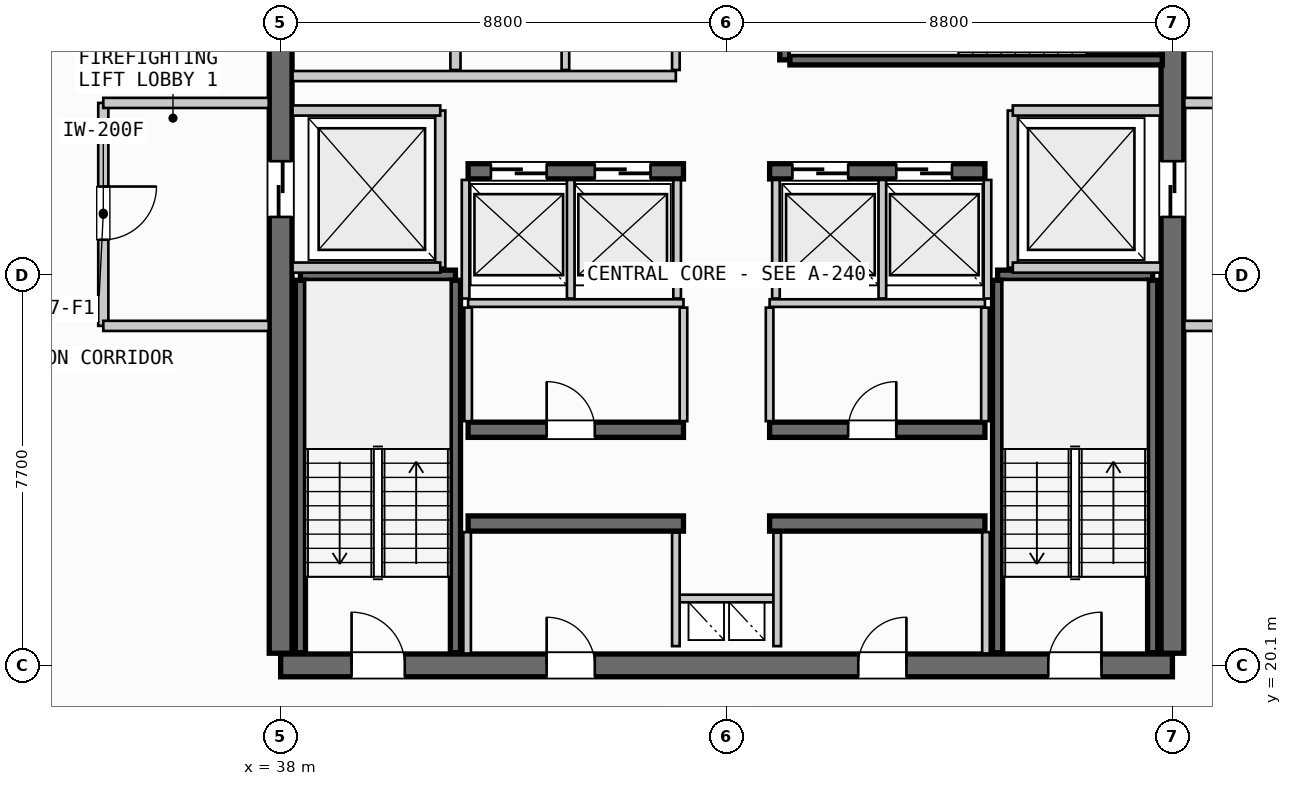
"""IFC4 building model, lengths in metres.
Left out: names, types, materials, properties, quantities, classifications, styles, units other than length and angle.
Written with IfcOpenShell. Run it as: python <this file> out.ifc"""

import sys

from ifc_helpers import new_model, si_unit, direction, frame, frame_2d, origin, place, context, subcontext, project, spatial, rectangle, extrude, source, transform, mapped, element, fill, save


model = new_model("IFC4")
c1 = context("Model", 3, precision=1e-05, world=origin(), true_north=direction((0.0, 1.0)))
c2 = subcontext(c1, "Body", "Model", "MODEL_VIEW")
j1 = project(units=[si_unit("LENGTHUNIT", "METRE"), si_unit("PLANEANGLEUNIT", "RADIAN")], contexts=[c1])
p1 = place(None, origin())
s1 = spatial("IfcSite", under=j1, at=p1, CompositionType="ELEMENT")
p2 = place(p1, origin())
s2 = spatial("IfcBuilding", under=s1, at=p2, CompositionType="ELEMENT")
p3 = place(p2, frame((0.0, 0.0, 290.5)))
s3 = spatial("IfcBuildingStorey", under=s2, at=p3, CompositionType="ELEMENT", Elevation=290.5)
p4 = place(p3, frame((38.0, 20.1, 0.0), z_axis=(0.0, 0.0, 1.0), x_axis=(1.0, 0.0, 0.0)))
e1 = element("IfcWall", 1, at=p4, inside=s3, PredefinedType="SHEAR", context=c2, shape_type="SweptSolid", body=[
    extrude(rectangle(XDim=17.6, YDim=0.45, at=frame_2d((8.8, 0.0))), origin(), (0.0, 0.0, 1.0), 3.21),
])
p5 = place(p4, frame((1.4, 0.0, 0.0)))
e2 = element("IfcOpeningElement", 2, at=p5, cuts=e1, PredefinedType="OPENING", context=c2, shape_type="SweptSolid", body=[
    extrude(rectangle(XDim=1.05, YDim=2.15, at=frame_2d((0.525, 1.075))), frame((0.0, 0.235, 0.0), z_axis=(0.0, -1.0, 0.0), x_axis=(1.0, 0.0, 0.0)), (0.0, 0.0, 1.0), 0.47),
])
p6 = place(p4, frame((15.15, 0.0, 0.0)))
e3 = element("IfcOpeningElement", 3, at=p6, cuts=e1, PredefinedType="OPENING", context=c2, shape_type="SweptSolid", body=[
    extrude(rectangle(XDim=1.05, YDim=2.15, at=frame_2d((0.525, 1.075))), frame((0.0, 0.235, 0.0), z_axis=(0.0, -1.0, 0.0), x_axis=(1.0, 0.0, 0.0)), (0.0, 0.0, 1.0), 0.47),
])
p7 = place(p4, frame((5.25, 0.0, 0.0)))
e4 = element("IfcOpeningElement", 4, at=p7, cuts=e1, PredefinedType="OPENING", context=c2, shape_type="SweptSolid", body=[
    extrude(rectangle(XDim=0.95, YDim=2.15, at=frame_2d((0.475, 1.075))), frame((0.0, 0.235, 0.0), z_axis=(0.0, -1.0, 0.0), x_axis=(1.0, 0.0, 0.0)), (0.0, 0.0, 1.0), 0.47),
])
p8 = place(p4, frame((11.4, 0.0, 0.0)))
e5 = element("IfcOpeningElement", 5, at=p8, cuts=e1, PredefinedType="OPENING", context=c2, shape_type="SweptSolid", body=[
    extrude(rectangle(XDim=0.95, YDim=2.15, at=frame_2d((0.475, 1.075))), frame((0.0, 0.235, 0.0), z_axis=(0.0, -1.0, 0.0), x_axis=(1.0, 0.0, 0.0)), (0.0, 0.0, 1.0), 0.47),
])
p9 = place(p3, frame((38.0, 35.26, 0.0), z_axis=(0.0, 0.0, 1.0), x_axis=(0.0, -1.0, 0.0)))
e6 = element("IfcWall", 6, at=p9, inside=s3, PredefinedType="SHEAR", context=c2, shape_type="SweptSolid", body=[
    extrude(rectangle(XDim=14.92, YDim=0.45, at=frame_2d((7.46, 0.0))), origin(), (0.0, 0.0, 1.0), 3.21),
])
p10 = place(p9, frame((5.21, 0.0, 0.0)))
e7 = element("IfcOpeningElement", 7, at=p10, cuts=e6, PredefinedType="OPENING", context=c2, shape_type="SweptSolid", body=[
    extrude(rectangle(XDim=1.1, YDim=2.2, at=frame_2d((0.55, 1.1))), frame((0.0, 0.235, 0.0), z_axis=(0.0, -1.0, 0.0), x_axis=(1.0, 0.0, 0.0)), (0.0, 0.0, 1.0), 0.47),
])
p11 = place(p3, frame((55.6, 20.34, 0.0), z_axis=(0.0, 0.0, 1.0), x_axis=(0.0, 1.0, 0.0)))
e8 = element("IfcWall", 8, at=p11, inside=s3, PredefinedType="SHEAR", context=c2, shape_type="SweptSolid", body=[
    extrude(rectangle(XDim=14.92, YDim=0.45, at=frame_2d((7.46, 0.0))), origin(), (0.0, 0.0, 1.0), 3.21),
])
p12 = place(p11, frame((12.71, 0.0, 0.0)))
e9 = element("IfcOpeningElement", 9, at=p12, cuts=e8, PredefinedType="OPENING", context=c2, shape_type="SweptSolid", body=[
    extrude(rectangle(XDim=1.05, YDim=2.15, at=frame_2d((0.525, 1.075))), frame((0.0, 0.235, 0.0), z_axis=(0.0, -1.0, 0.0), x_axis=(1.0, 0.0, 0.0)), (0.0, 0.0, 1.0), 0.47),
])
p13 = place(p11, frame((8.61, 0.0, 0.0)))
e10 = element("IfcOpeningElement", 10, at=p13, cuts=e8, PredefinedType="OPENING", context=c2, shape_type="SweptSolid", body=[
    extrude(rectangle(XDim=1.1, YDim=2.2, at=frame_2d((0.55, 1.1))), frame((0.0, 0.235, 0.0), z_axis=(0.0, -1.0, 0.0), x_axis=(1.0, 0.0, 0.0)), (0.0, 0.0, 1.0), 0.47),
])
for number, where, z_axis, x_axis in (
    (11, (41.7, 22.9, 0.0), (0.0, 0.0, 1.0), (1.0, 0.0, 0.0)),
    (12, (47.65, 22.9, 0.0), (0.0, 0.0, 1.0), (1.0, 0.0, 0.0)),
):
    element("IfcWall", number, at=place(p3, frame(where, z_axis=z_axis, x_axis=x_axis)), inside=s3, PredefinedType="SHEAR", context=c2, shape_type="SweptSolid", body=[
        extrude(rectangle(XDim=4.25, YDim=0.3, at=frame_2d((2.125, 0.0))), origin(), (0.0, 0.0, 1.0), 3.21),
    ])
p14 = place(p3, frame((41.7, 24.75, 0.0), z_axis=(0.0, 0.0, 1.0), x_axis=(1.0, 0.0, 0.0)))
e13 = element("IfcWall", 13, at=p14, inside=s3, PredefinedType="SHEAR", context=c2, shape_type="SweptSolid", body=[
    extrude(rectangle(XDim=4.25, YDim=0.3, at=frame_2d((2.125, 0.0))), origin(), (0.0, 0.0, 1.0), 3.21),
])
p15 = place(p14, frame((1.55, 0.0, 0.0)))
e14 = element("IfcOpeningElement", 14, at=p15, cuts=e13, PredefinedType="OPENING", context=c2, shape_type="SweptSolid", body=[
    extrude(rectangle(XDim=0.95, YDim=2.15, at=frame_2d((0.475, 1.075))), frame((0.0, 0.16, 0.0), z_axis=(0.0, -1.0, 0.0), x_axis=(1.0, 0.0, 0.0)), (0.0, 0.0, 1.0), 0.32),
])
p16 = place(p3, frame((47.65, 24.75, 0.0), z_axis=(0.0, 0.0, 1.0), x_axis=(1.0, 0.0, 0.0)))
e15 = element("IfcWall", 15, at=p16, inside=s3, PredefinedType="SHEAR", context=c2, shape_type="SweptSolid", body=[
    extrude(rectangle(XDim=4.25, YDim=0.3, at=frame_2d((2.125, 0.0))), origin(), (0.0, 0.0, 1.0), 3.21),
])
p17 = place(p16, frame((1.55, 0.0, 0.0)))
e16 = element("IfcOpeningElement", 16, at=p17, cuts=e15, PredefinedType="OPENING", context=c2, shape_type="SweptSolid", body=[
    extrude(rectangle(XDim=0.95, YDim=2.15, at=frame_2d((0.475, 1.075))), frame((0.0, 0.16, 0.0), z_axis=(0.0, -1.0, 0.0), x_axis=(1.0, 0.0, 0.0)), (0.0, 0.0, 1.0), 0.32),
])
p18 = place(p3, frame((41.7, 29.85, 0.0), z_axis=(0.0, 0.0, 1.0), x_axis=(1.0, 0.0, 0.0)))
e17 = element("IfcWall", 17, at=p18, inside=s3, PredefinedType="SHEAR", context=c2, shape_type="SweptSolid", body=[
    extrude(rectangle(XDim=4.25, YDim=0.3, at=frame_2d((2.125, 0.0))), origin(), (0.0, 0.0, 1.0), 3.21),
])
p19 = place(p18, frame((0.45, 0.0, 0.0)))
e18 = element("IfcOpeningElement", 18, at=p19, cuts=e17, PredefinedType="OPENING", context=c2, shape_type="SweptSolid", body=[
    extrude(rectangle(XDim=1.1, YDim=2.2, at=frame_2d((0.55, 1.1))), frame((0.0, 0.16, 0.0), z_axis=(0.0, -1.0, 0.0), x_axis=(1.0, 0.0, 0.0)), (0.0, 0.0, 1.0), 0.32),
])
p20 = place(p18, frame((2.5, 0.0, 0.0)))
e19 = element("IfcOpeningElement", 19, at=p20, cuts=e17, PredefinedType="OPENING", context=c2, shape_type="SweptSolid", body=[
    extrude(rectangle(XDim=1.1, YDim=2.2, at=frame_2d((0.55, 1.1))), frame((0.0, 0.16, 0.0), z_axis=(0.0, -1.0, 0.0), x_axis=(1.0, 0.0, 0.0)), (0.0, 0.0, 1.0), 0.32),
])
p21 = place(p3, frame((47.65, 29.85, 0.0), z_axis=(0.0, 0.0, 1.0), x_axis=(1.0, 0.0, 0.0)))
e20 = element("IfcWall", 20, at=p21, inside=s3, PredefinedType="SHEAR", context=c2, shape_type="SweptSolid", body=[
    extrude(rectangle(XDim=4.25, YDim=0.3, at=frame_2d((2.125, 0.0))), origin(), (0.0, 0.0, 1.0), 3.21),
])
p22 = place(p21, frame((0.45, 0.0, 0.0)))
e21 = element("IfcOpeningElement", 21, at=p22, cuts=e20, PredefinedType="OPENING", context=c2, shape_type="SweptSolid", body=[
    extrude(rectangle(XDim=1.1, YDim=2.2, at=frame_2d((0.55, 1.1))), frame((0.0, 0.16, 0.0), z_axis=(0.0, -1.0, 0.0), x_axis=(1.0, 0.0, 0.0)), (0.0, 0.0, 1.0), 0.32),
])
p23 = place(p21, frame((2.5, 0.0, 0.0)))
e22 = element("IfcOpeningElement", 22, at=p23, cuts=e20, PredefinedType="OPENING", context=c2, shape_type="SweptSolid", body=[
    extrude(rectangle(XDim=1.1, YDim=2.2, at=frame_2d((0.55, 1.1))), frame((0.0, 0.16, 0.0), z_axis=(0.0, -1.0, 0.0), x_axis=(1.0, 0.0, 0.0)), (0.0, 0.0, 1.0), 0.32),
])
p24 = place(p3, frame((38.39, 27.8, 0.0), z_axis=(0.0, 0.0, 1.0), x_axis=(1.0, 0.0, 0.0)))
e23 = element("IfcWall", 23, at=p24, inside=s3, PredefinedType="SHEAR", context=c2, shape_type="SweptSolid", body=[
    extrude(rectangle(XDim=3.06, YDim=0.2, at=frame_2d((1.53, 0.0))), origin(), (0.0, 0.0, 1.0), 3.21),
])
for number, where, z_axis, x_axis in (
    (24, (41.45, 27.7, 0.0), (0.0, 0.0, 1.0), (0.0, -1.0, 0.0)),
    (25, (38.39, 20.35, 0.0), (0.0, 0.0, 1.0), (0.0, 1.0, 0.0)),
):
    element("IfcWall", number, at=place(p3, frame(where, z_axis=z_axis, x_axis=x_axis)), inside=s3, PredefinedType="SHEAR", context=c2, shape_type="SweptSolid", body=[
        extrude(rectangle(XDim=7.35, YDim=0.2, at=frame_2d((3.675, 0.0))), origin(), (0.0, 0.0, 1.0), 3.21),
    ])
p25 = place(p3, frame((52.15, 27.8, 0.0), z_axis=(0.0, 0.0, 1.0), x_axis=(1.0, 0.0, 0.0)))
e26 = element("IfcWall", 26, at=p25, inside=s3, PredefinedType="SHEAR", context=c2, shape_type="SweptSolid", body=[
    extrude(rectangle(XDim=3.06, YDim=0.2, at=frame_2d((1.53, 0.0))), origin(), (0.0, 0.0, 1.0), 3.21),
])
for number, where, z_axis, x_axis in (
    (27, (55.21, 27.7, 0.0), (0.0, 0.0, 1.0), (0.0, -1.0, 0.0)),
    (28, (52.15, 20.35, 0.0), (0.0, 0.0, 1.0), (0.0, 1.0, 0.0)),
):
    element("IfcWall", number, at=place(p3, frame(where, z_axis=z_axis, x_axis=x_axis)), inside=s3, PredefinedType="SHEAR", context=c2, shape_type="SweptSolid", body=[
        extrude(rectangle(XDim=7.35, YDim=0.2, at=frame_2d((3.675, 0.0))), origin(), (0.0, 0.0, 1.0), 3.21),
    ])
p26 = place(p3, frame((47.95, 32.05, 0.0), z_axis=(0.0, 0.0, 1.0), x_axis=(0.0, 1.0, 0.0)))
e29 = element("IfcWall", 29, at=p26, inside=s3, PredefinedType="SHEAR", context=c2, shape_type="SweptSolid", body=[
    extrude(rectangle(XDim=3.06, YDim=0.2, at=frame_2d((1.53, 0.0))), origin(), (0.0, 0.0, 1.0), 3.21),
])
p27 = place(p3, frame((55.4, 32.05, 0.0), z_axis=(0.0, 0.0, 1.0), x_axis=(-1.0, 0.0, 0.0)))
e30 = element("IfcWall", 30, at=p27, inside=s3, PredefinedType="SHEAR", context=c2, shape_type="SweptSolid", body=[
    extrude(rectangle(XDim=7.35, YDim=0.2, at=frame_2d((3.675, 0.0))), origin(), (0.0, 0.0, 1.0), 3.21),
])
p28 = place(p3, frame((45.8, 21.42, 0.0), z_axis=(0.0, 0.0, 1.0), x_axis=(1.0, 0.0, 0.0)))
e31 = element("IfcWall", 31, at=p28, inside=s3, PredefinedType="PARTITIONING", context=c2, shape_type="SweptSolid", body=[
    extrude(rectangle(XDim=2.0, YDim=0.15, at=frame_2d((1.0, 0.0))), origin(), (0.0, 0.0, 1.0), 2.315),
])
for number, where, z_axis, x_axis in (
    (32, (45.8, 20.48, 0.0), (0.0, 0.0, 1.0), (0.0, 1.0, 0.0)),
    (33, (47.8, 20.48, 0.0), (0.0, 0.0, 1.0), (0.0, 1.0, 0.0)),
):
    element("IfcWall", number, at=place(p3, frame(where, z_axis=z_axis, x_axis=x_axis)), inside=s3, PredefinedType="PARTITIONING", context=c2, shape_type="SweptSolid", body=[
        extrude(rectangle(XDim=2.24, YDim=0.15, at=frame_2d((1.12, 0.0))), origin(), (0.0, 0.0, 1.0), 2.315),
    ])
p29 = place(p3, frame((41.15, 27.95, 0.0), z_axis=(0.0, 0.0, 1.0), x_axis=(0.0, 1.0, 0.0)))
e34 = element("IfcWall", 34, at=p29, inside=s3, PredefinedType="PARTITIONING", context=c2, shape_type="SweptSolid", body=[
    extrude(rectangle(XDim=3.1, YDim=0.2, at=frame_2d((1.55, 0.0))), origin(), (0.0, 0.0, 1.0), 2.315),
])
for number, where, z_axis, x_axis in (
    (35, (38.235, 27.95, 0.0), (0.0, 0.0, 1.0), (1.0, 0.0, 0.0)),
    (36, (38.235, 31.05, 0.0), (0.0, 0.0, 1.0), (1.0, 0.0, 0.0)),
):
    element("IfcWall", number, at=place(p3, frame(where, z_axis=z_axis, x_axis=x_axis)), inside=s3, PredefinedType="PARTITIONING", context=c2, shape_type="SweptSolid", body=[
        extrude(rectangle(XDim=2.915, YDim=0.2, at=frame_2d((1.458, 0.0))), origin(), (0.0, 0.0, 1.0), 2.315),
    ])
p30 = place(p3, frame((34.5, 31.2, 0.0), z_axis=(0.0, 0.0, 1.0), x_axis=(0.0, -1.0, 0.0)))
e37 = element("IfcWall", 37, at=p30, inside=s3, PredefinedType="PARTITIONING", context=c2, shape_type="SweptSolid", body=[
    extrude(rectangle(XDim=4.4, YDim=0.2, at=frame_2d((2.2, 0.0))), origin(), (0.0, 0.0, 1.0), 2.315),
])
p31 = place(p30, frame((1.65, 0.0, 0.0)))
e38 = element("IfcOpeningElement", 38, at=p31, cuts=e37, PredefinedType="OPENING", context=c2, shape_type="SweptSolid", body=[
    extrude(rectangle(XDim=1.05, YDim=2.15, at=frame_2d((0.525, 1.075))), frame((0.0, 0.11, 0.0), z_axis=(0.0, -1.0, 0.0), x_axis=(1.0, 0.0, 0.0)), (0.0, 0.0, 1.0), 0.22),
])
for number, where, z_axis, x_axis in (
    (39, (34.5, 26.8, 0.0), (0.0, 0.0, 1.0), (1.0, 0.0, 0.0)),
    (40, (34.5, 31.2, 0.0), (0.0, 0.0, 1.0), (1.0, 0.0, 0.0)),
):
    element("IfcWall", number, at=place(p3, frame(where, z_axis=z_axis, x_axis=x_axis)), inside=s3, PredefinedType="PARTITIONING", context=c2, shape_type="SweptSolid", body=[
        extrude(rectangle(XDim=3.265, YDim=0.2, at=frame_2d((1.632, 0.0))), origin(), (0.0, 0.0, 1.0), 2.315),
    ])
p32 = place(p3, frame((52.45, 27.95, 0.0), z_axis=(0.0, 0.0, 1.0), x_axis=(0.0, 1.0, 0.0)))
e41 = element("IfcWall", 41, at=p32, inside=s3, PredefinedType="PARTITIONING", context=c2, shape_type="SweptSolid", body=[
    extrude(rectangle(XDim=3.1, YDim=0.2, at=frame_2d((1.55, 0.0))), origin(), (0.0, 0.0, 1.0), 2.315),
])
for number, where, z_axis, x_axis in (
    (42, (52.45, 27.95, 0.0), (0.0, 0.0, 1.0), (1.0, 0.0, 0.0)),
    (43, (52.45, 31.05, 0.0), (0.0, 0.0, 1.0), (1.0, 0.0, 0.0)),
):
    element("IfcWall", number, at=place(p3, frame(where, z_axis=z_axis, x_axis=x_axis)), inside=s3, PredefinedType="PARTITIONING", context=c2, shape_type="SweptSolid", body=[
        extrude(rectangle(XDim=2.915, YDim=0.2, at=frame_2d((1.458, 0.0))), origin(), (0.0, 0.0, 1.0), 2.315),
    ])
for number, where, z_axis, x_axis in (
    (44, (55.835, 26.8, 0.0), (0.0, 0.0, 1.0), (1.0, 0.0, 0.0)),
    (45, (55.835, 31.2, 0.0), (0.0, 0.0, 1.0), (1.0, 0.0, 0.0)),
):
    element("IfcWall", number, at=place(p3, frame(where, z_axis=z_axis, x_axis=x_axis)), inside=s3, PredefinedType="PARTITIONING", context=c2, shape_type="SweptSolid", body=[
        extrude(rectangle(XDim=3.265, YDim=0.2, at=frame_2d((1.633, 0.0))), origin(), (0.0, 0.0, 1.0), 2.315),
    ])
for number, where, z_axis, x_axis in (
    (46, (41.68, 20.335, 0.0), (0.0, 0.0, 1.0), (0.0, 1.0, 0.0)),
    (47, (51.92, 20.335, 0.0), (0.0, 0.0, 1.0), (0.0, 1.0, 0.0)),
):
    element("IfcWall", number, at=place(p3, frame(where, z_axis=z_axis, x_axis=x_axis)), inside=s3, PredefinedType="PARTITIONING", context=c2, shape_type="SweptSolid", body=[
        extrude(rectangle(XDim=2.395, YDim=0.15, at=frame_2d((1.198, 0.0))), origin(), (0.0, 0.0, 1.0), 2.315),
    ])
for number, where, z_axis, x_axis in (
    (48, (41.7, 27.25, 0.0), (0.0, 0.0, 1.0), (1.0, 0.0, 0.0)),
    (49, (47.65, 27.25, 0.0), (0.0, 0.0, 1.0), (1.0, 0.0, 0.0)),
):
    element("IfcWall", number, at=place(p3, frame(where, z_axis=z_axis, x_axis=x_axis)), inside=s3, PredefinedType="PARTITIONING", context=c2, shape_type="SweptSolid", body=[
        extrude(rectangle(XDim=4.25, YDim=0.15, at=frame_2d((2.125, 0.0))), origin(), (0.0, 0.0, 1.0), 2.315),
    ])
for number, where, z_axis, x_axis in (
    (50, (41.7, 24.92, 0.0), (0.0, 0.0, 1.0), (0.0, 1.0, 0.0)),
    (51, (45.95, 24.92, 0.0), (0.0, 0.0, 1.0), (0.0, 1.0, 0.0)),
    (52, (47.65, 24.92, 0.0), (0.0, 0.0, 1.0), (0.0, 1.0, 0.0)),
    (53, (51.9, 24.92, 0.0), (0.0, 0.0, 1.0), (0.0, 1.0, 0.0)),
):
    element("IfcWall", number, at=place(p3, frame(where, z_axis=z_axis, x_axis=x_axis)), inside=s3, PredefinedType="PARTITIONING", context=c2, shape_type="SweptSolid", body=[
        extrude(rectangle(XDim=2.24, YDim=0.15, at=frame_2d((1.12, 0.0))), origin(), (0.0, 0.0, 1.0), 2.315),
    ])
for number, where, z_axis, x_axis in (
    (54, (41.65, 27.34, 0.0), (0.0, 0.0, 1.0), (0.0, 1.0, 0.0)),
    (55, (43.725, 27.34, 0.0), (0.0, 0.0, 1.0), (0.0, 1.0, 0.0)),
    (56, (45.825, 27.34, 0.0), (0.0, 0.0, 1.0), (0.0, 1.0, 0.0)),
    (57, (47.775, 27.34, 0.0), (0.0, 0.0, 1.0), (0.0, 1.0, 0.0)),
    (58, (49.875, 27.34, 0.0), (0.0, 0.0, 1.0), (0.0, 1.0, 0.0)),
    (59, (51.95, 27.34, 0.0), (0.0, 0.0, 1.0), (0.0, 1.0, 0.0)),
):
    element("IfcWall", number, at=place(p3, frame(where, z_axis=z_axis, x_axis=x_axis)), inside=s3, PredefinedType="PARTITIONING", context=c2, shape_type="SweptSolid", body=[
        extrude(rectangle(XDim=2.34, YDim=0.15, at=frame_2d((1.17, 0.0))), origin(), (0.0, 0.0, 1.0), 2.315),
    ])
p33 = place(p3, frame((41.45, 31.85, 0.0), z_axis=(0.0, 0.0, 1.0), x_axis=(0.0, 1.0, 0.0)))
e60 = element("IfcWall", 60, at=p33, inside=s3, PredefinedType="PARTITIONING", context=c2, shape_type="SweptSolid", body=[
    extrude(rectangle(XDim=3.415, YDim=0.2, at=frame_2d((1.708, 0.0))), origin(), (0.0, 0.0, 1.0), 2.315),
])
p34 = place(p3, frame((38.235, 31.73, 0.0), z_axis=(0.0, 0.0, 1.0), x_axis=(1.0, 0.0, 0.0)))
e61 = element("IfcWall", 61, at=p34, inside=s3, PredefinedType="PARTITIONING", context=c2, shape_type="SweptSolid", body=[
    extrude(rectangle(XDim=7.565, YDim=0.2, at=frame_2d((3.782, 0.0))), origin(), (0.0, 0.0, 1.0), 2.315),
])
p35 = place(p3, frame((45.8, 31.85, 0.0), z_axis=(0.0, 0.0, 1.0), x_axis=(0.0, 1.0, 0.0)))
e62 = element("IfcWall", 62, at=p35, inside=s3, PredefinedType="PARTITIONING", context=c2, shape_type="SweptSolid", body=[
    extrude(rectangle(XDim=3.415, YDim=0.15, at=frame_2d((1.708, 0.0))), origin(), (0.0, 0.0, 1.0), 2.315),
])
p36 = place(p3, frame((43.62, 31.85, 0.0), z_axis=(0.0, 0.0, 1.0), x_axis=(0.0, 1.0, 0.0)))
e63 = element("IfcWall", 63, at=p36, inside=s3, PredefinedType="PLUMBINGWALL", context=c2, shape_type="SweptSolid", body=[
    extrude(rectangle(XDim=3.415, YDim=0.15, at=frame_2d((1.708, 0.0))), origin(), (0.0, 0.0, 1.0), 2.315),
])
m1 = source(origin(), c2, "Body", "SweptSolid", [
    extrude(rectangle(XDim=1.05, YDim=2.15, at=frame_2d((0.525, 1.075))), frame((0.0, 0.025, 0.0), z_axis=(0.0, -1.0, 0.0), x_axis=(1.0, 0.0, 0.0)), (0.0, 0.0, 1.0), 0.05),
])
p37 = place(p5, origin())
e64 = element("IfcDoor", 64, at=p37, inside=s3, OperationType="SINGLE_SWING_LEFT", PredefinedType="DOOR", context=c2, shape_type="MappedRepresentation", body=[
    mapped(m1, transform((0.0, 0.0, 0.0), scale=1.0)),
])
fill(e2, e64)
p38 = place(p6, origin())
e65 = element("IfcDoor", 65, at=p38, inside=s3, OperationType="SINGLE_SWING_RIGHT", PredefinedType="DOOR", context=c2, shape_type="MappedRepresentation", body=[
    mapped(m1, transform((0.0, 0.0, 0.0), scale=1.0)),
])
fill(e3, e65)
m2 = source(origin(), c2, "Body", "SweptSolid", [
    extrude(rectangle(XDim=1.1, YDim=2.2, at=frame_2d((0.55, 1.1))), frame((0.0, 0.025, 0.0), z_axis=(0.0, -1.0, 0.0), x_axis=(1.0, 0.0, 0.0)), (0.0, 0.0, 1.0), 0.05),
])
p39 = place(p10, origin())
e66 = element("IfcDoor", 66, at=p39, inside=s3, OperationType="SLIDING_TO_LEFT", PredefinedType="DOOR", context=c2, shape_type="MappedRepresentation", body=[
    mapped(m2, transform((0.0, 0.0, 0.0), scale=1.0)),
])
fill(e7, e66)
p40 = place(p13, origin())
e67 = element("IfcDoor", 67, at=p40, inside=s3, OperationType="SLIDING_TO_RIGHT", PredefinedType="DOOR", context=c2, shape_type="MappedRepresentation", body=[
    mapped(m2, transform((0.0, 0.0, 0.0), scale=1.0)),
])
fill(e10, e67)
m3 = source(origin(), c2, "Body", "SweptSolid", [
    extrude(rectangle(XDim=0.95, YDim=2.15, at=frame_2d((0.475, 1.075))), frame((0.0, 0.025, 0.0), z_axis=(0.0, -1.0, 0.0), x_axis=(1.0, 0.0, 0.0)), (0.0, 0.0, 1.0), 0.05),
])
p41 = place(p7, origin())
e68 = element("IfcDoor", 68, at=p41, inside=s3, OperationType="SINGLE_SWING_LEFT", PredefinedType="DOOR", context=c2, shape_type="MappedRepresentation", body=[
    mapped(m3, transform((0.0, 0.0, 0.0), scale=1.0)),
])
fill(e4, e68)
p42 = place(p8, origin())
e69 = element("IfcDoor", 69, at=p42, inside=s3, OperationType="SINGLE_SWING_RIGHT", PredefinedType="DOOR", context=c2, shape_type="MappedRepresentation", body=[
    mapped(m3, transform((0.0, 0.0, 0.0), scale=1.0)),
])
fill(e5, e69)
p43 = place(p15, origin())
e70 = element("IfcDoor", 70, at=p43, inside=s3, OperationType="SINGLE_SWING_LEFT", PredefinedType="DOOR", context=c2, shape_type="MappedRepresentation", body=[
    mapped(m3, transform((0.0, 0.0, 0.0), scale=1.0)),
])
fill(e14, e70)
p44 = place(p17, origin())
e71 = element("IfcDoor", 71, at=p44, inside=s3, OperationType="SINGLE_SWING_RIGHT", PredefinedType="DOOR", context=c2, shape_type="MappedRepresentation", body=[
    mapped(m3, transform((0.0, 0.0, 0.0), scale=1.0)),
])
fill(e16, e71)
p45 = place(p19, origin())
e72 = element("IfcDoor", 72, at=p45, inside=s3, OperationType="SLIDING_TO_LEFT", PredefinedType="DOOR", context=c2, shape_type="MappedRepresentation", body=[
    mapped(m2, transform((0.0, 0.0, 0.0), scale=1.0)),
])
fill(e18, e72)
p46 = place(p20, origin())
e73 = element("IfcDoor", 73, at=p46, inside=s3, OperationType="SLIDING_TO_LEFT", PredefinedType="DOOR", context=c2, shape_type="MappedRepresentation", body=[
    mapped(m2, transform((0.0, 0.0, 0.0), scale=1.0)),
])
fill(e19, e73)
p47 = place(p22, origin())
e74 = element("IfcDoor", 74, at=p47, inside=s3, OperationType="SLIDING_TO_LEFT", PredefinedType="DOOR", context=c2, shape_type="MappedRepresentation", body=[
    mapped(m2, transform((0.0, 0.0, 0.0), scale=1.0)),
])
fill(e21, e74)
p48 = place(p23, origin())
e75 = element("IfcDoor", 75, at=p48, inside=s3, OperationType="SLIDING_TO_LEFT", PredefinedType="DOOR", context=c2, shape_type="MappedRepresentation", body=[
    mapped(m2, transform((0.0, 0.0, 0.0), scale=1.0)),
])
fill(e22, e75)
p49 = place(p31, origin())
e76 = element("IfcDoor", 76, at=p49, inside=s3, OperationType="SINGLE_SWING_LEFT", PredefinedType="DOOR", context=c2, shape_type="MappedRepresentation", body=[
    mapped(m1, transform((0.0, 0.0, 0.0), scale=1.0)),
])
fill(e38, e76)
save(model, sys.argv[1])
